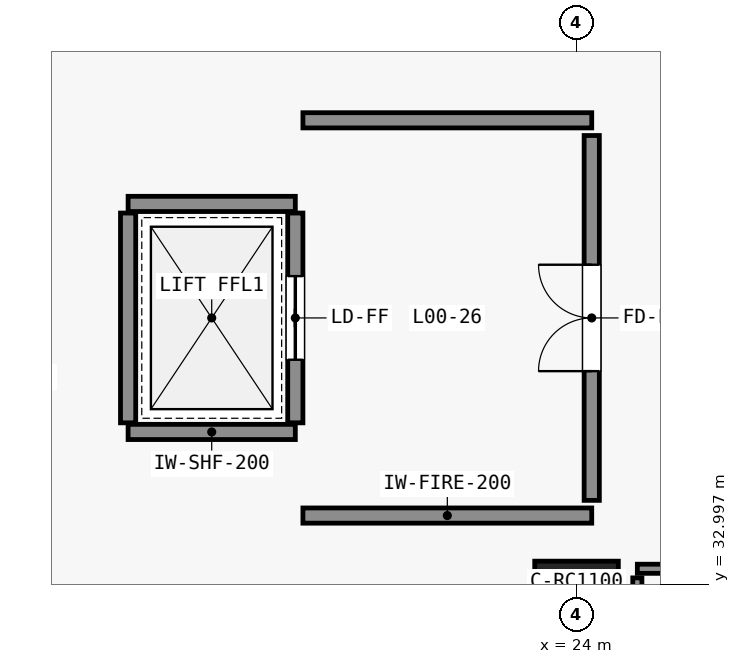
"""IFC4 building model, lengths in metres.
Left out: names, types, materials, properties, quantities, classifications, styles, units other than length and angle.
Written with IfcOpenShell. Run it as: python <this file> out.ifc"""

import sys

from ifc_helpers import new_model, si_unit, direction, frame, frame_2d, origin, origin_2d, place, context, subcontext, project, spatial, rectangle, extrude, element, fill, save


model = new_model("IFC4")
c1 = context("Model", 3, precision=1e-05, world=origin(), true_north=direction((0.0, 1.0)))
c2 = subcontext(c1, "Body", "Model", "MODEL_VIEW")
j1 = project(units=[si_unit("LENGTHUNIT", "METRE"), si_unit("PLANEANGLEUNIT", "RADIAN")], contexts=[c1])
p1 = place(None, origin())
s1 = spatial("IfcSite", under=j1, at=p1, CompositionType="ELEMENT")
p2 = place(p1, origin())
s2 = spatial("IfcBuilding", under=s1, at=p2, CompositionType="ELEMENT")
p3 = place(p2, origin())
s3 = spatial("IfcBuildingStorey", under=s2, at=p3, CompositionType="ELEMENT", Elevation=0.0)
p4 = place(p3, frame((24.0, 32.6, 0.0), z_axis=(0.0, 0.0, 1.0), x_axis=(1.0, 0.0, 0.0)))
e1 = element("IfcColumn", 1, at=p4, inside=s3, PredefinedType="COLUMN", context=c2, shape_type="SweptSolid", body=[
    extrude(rectangle(XDim=1.1, YDim=1.4, at=origin_2d()), origin(), (0.0, 0.0, 1.0), 6.0),
])
for number, where, z_axis, x_axis in (
    (2, (18.1, 35.0, 0.0), (0.0, 0.0, 1.0), (1.0, 0.0, 0.0)),
    (3, (18.1, 38.0, 0.0), (0.0, 0.0, 1.0), (1.0, 0.0, 0.0)),
):
    element("IfcWall", number, at=place(p3, frame(where, z_axis=z_axis, x_axis=x_axis)), inside=s3, PredefinedType="STANDARD", context=c2, shape_type="SweptSolid", body=[
        extrude(rectangle(XDim=2.2, YDim=0.2, at=frame_2d((1.1, 0.0))), origin(), (0.0, 0.0, 1.0), 5.64),
    ])
p5 = place(p3, frame((18.1, 35.12, 0.0), z_axis=(0.0, 0.0, 1.0), x_axis=(0.0, 1.0, 0.0)))
e4 = element("IfcWall", 4, at=p5, inside=s3, PredefinedType="STANDARD", context=c2, shape_type="SweptSolid", body=[
    extrude(rectangle(XDim=2.76, YDim=0.2, at=frame_2d((1.38, 0.0))), origin(), (0.0, 0.0, 1.0), 5.64),
])
p6 = place(p3, frame((20.3, 35.12, 0.0), z_axis=(0.0, 0.0, 1.0), x_axis=(0.0, 1.0, 0.0)))
e5 = element("IfcWall", 5, at=p6, inside=s3, PredefinedType="STANDARD", context=c2, shape_type="SweptSolid", body=[
    extrude(rectangle(XDim=2.76, YDim=0.2, at=frame_2d((1.38, 0.0))), origin(), (0.0, 0.0, 1.0), 5.64),
])
p7 = place(p6, frame((0.83, 0.0, 0.0)))
e6 = element("IfcOpeningElement", 6, at=p7, cuts=e5, PredefinedType="OPENING", context=c2, shape_type="SweptSolid", body=[
    extrude(rectangle(XDim=1.1, YDim=2.15, at=frame_2d((0.55, 1.075))), frame((0.0, 0.11, 0.0), z_axis=(0.0, -1.0, 0.0), x_axis=(1.0, 0.0, 0.0)), (0.0, 0.0, 1.0), 0.22),
])
for number, where, z_axis, x_axis in (
    (7, (20.4, 33.9, 0.0), (0.0, 0.0, 1.0), (1.0, 0.0, 0.0)),
    (8, (20.4, 39.1, 0.0), (0.0, 0.0, 1.0), (1.0, 0.0, 0.0)),
):
    element("IfcWall", number, at=place(p3, frame(where, z_axis=z_axis, x_axis=x_axis)), inside=s3, PredefinedType="STANDARD", context=c2, shape_type="SweptSolid", body=[
        extrude(rectangle(XDim=3.8, YDim=0.2, at=frame_2d((1.9, 0.0))), origin(), (0.0, 0.0, 1.0), 4.79),
    ])
p8 = place(p3, frame((24.2, 34.1, 0.0), z_axis=(0.0, 0.0, 1.0), x_axis=(0.0, 1.0, 0.0)))
e9 = element("IfcWall", 9, at=p8, inside=s3, PredefinedType="STANDARD", context=c2, shape_type="SweptSolid", body=[
    extrude(rectangle(XDim=4.8, YDim=0.2, at=frame_2d((2.4, 0.0))), origin(), (0.0, 0.0, 1.0), 4.79),
])
p9 = place(p8, frame((1.7, 0.0, 0.0)))
e10 = element("IfcOpeningElement", 10, at=p9, cuts=e9, PredefinedType="OPENING", context=c2, shape_type="SweptSolid", body=[
    extrude(rectangle(XDim=1.4, YDim=2.2, at=frame_2d((0.7, 1.1))), frame((0.0, 0.11, 0.0), z_axis=(0.0, -1.0, 0.0), x_axis=(1.0, 0.0, 0.0)), (0.0, 0.0, 1.0), 0.22),
])
p10 = place(p3, frame((24.8, 33.2, 0.0), z_axis=(0.0, 0.0, 1.0), x_axis=(1.0, 0.0, 0.0)))
e11 = element("IfcWall", 11, at=p10, inside=s3, PredefinedType="PARTITIONING", context=c2, shape_type="SweptSolid", body=[
    extrude(rectangle(XDim=17.7, YDim=0.12, at=frame_2d((8.85, 0.0))), origin(), (0.0, 0.0, 1.0), 4.79),
])
p11 = place(p3, frame((24.8, 26.52, 0.0), z_axis=(0.0, 0.0, 1.0), x_axis=(0.0, 1.0, 0.0)))
e12 = element("IfcWall", 12, at=p11, inside=s3, PredefinedType="PARTITIONING", context=c2, shape_type="SweptSolid", body=[
    extrude(rectangle(XDim=6.56, YDim=0.12, at=frame_2d((3.28, 0.0))), origin(), (0.0, 0.0, 1.0), 4.79),
])
p12 = place(p7, origin())
e13 = element("IfcDoor", 13, at=p12, inside=s3, OperationType="SLIDING_TO_LEFT", PredefinedType="DOOR", context=c2, shape_type="SweptSolid", body=[
    extrude(rectangle(XDim=1.1, YDim=2.15, at=frame_2d((0.55, 1.075))), frame((0.0, 0.025, 0.0), z_axis=(0.0, -1.0, 0.0), x_axis=(1.0, 0.0, 0.0)), (0.0, 0.0, 1.0), 0.05),
])
fill(e6, e13)
p13 = place(p9, origin())
e14 = element("IfcDoor", 14, at=p13, inside=s3, OperationType="DOUBLE_DOOR_SINGLE_SWING", PredefinedType="DOOR", context=c2, shape_type="SweptSolid", body=[
    extrude(rectangle(XDim=1.4, YDim=2.2, at=frame_2d((0.7, 1.1))), frame((0.0, 0.025, 0.0), z_axis=(0.0, -1.0, 0.0), x_axis=(1.0, 0.0, 0.0)), (0.0, 0.0, 1.0), 0.05),
])
fill(e10, e14)
save(model, sys.argv[1])
